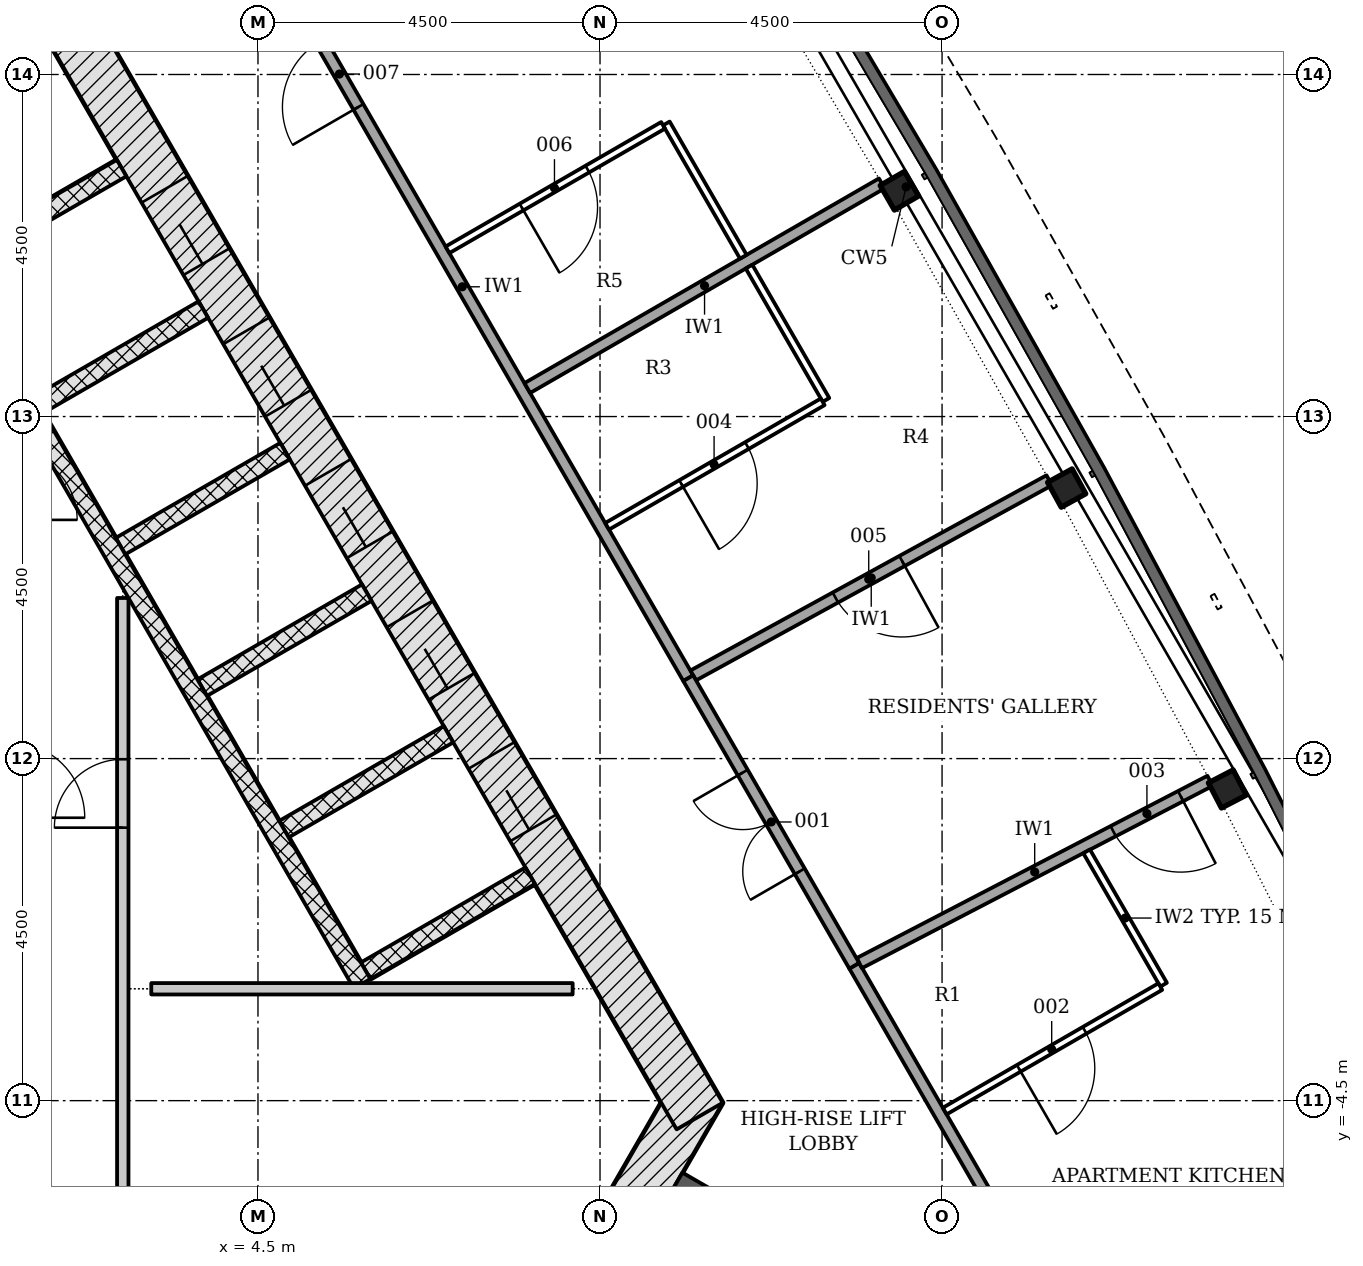
"""IFC4 building model, lengths in metres.
Left out: names, types, materials, properties, quantities, classifications, styles, units other than length and angle.
Written with IfcOpenShell. Run it as: python <this file> out.ifc"""

import sys

from ifc_helpers import new_model, si_unit, direction, frame, frame_2d, origin, origin_2d, place, context, subcontext, project, spatial, polyline, rectangle, i_section, outline, extrude, element, fill, save


model = new_model("IFC4")
c1 = context("Model", 3, precision=1e-05, world=origin(), true_north=direction((0.0, 1.0)))
c2 = subcontext(c1, "Body", "Model", "MODEL_VIEW")
j1 = project(units=[si_unit("LENGTHUNIT", "METRE"), si_unit("PLANEANGLEUNIT", "RADIAN")], contexts=[c1])
p1 = place(None, origin())
s1 = spatial("IfcSite", under=j1, at=p1, CompositionType="ELEMENT")
p2 = place(p1, origin())
s2 = spatial("IfcBuilding", under=s1, at=p2, CompositionType="ELEMENT")
p3 = place(p2, frame((0.0, 0.0, 222.0)))
s3 = spatial("IfcBuildingStorey", under=s2, at=p3, CompositionType="ELEMENT", Elevation=222.0)
p4 = place(p3, frame((8.926, -6.753, -0.2), z_axis=(0.0, 0.0, 1.0), x_axis=(0.500042739161, 0.866000726912, 0.0)))
e1 = element("IfcWall", 1, at=p4, inside=s3, PredefinedType="SHEAR", context=c2, shape_type="SweptSolid", body=[
    extrude(rectangle(XDim=2.771, YDim=0.7, at=frame_2d((1.386, 0.0))), origin(), (0.0, 0.0, 1.0), 3.6),
])
p5 = place(p3, frame((10.311, -4.703, -0.2), z_axis=(0.0, 0.0, 1.0), x_axis=(-0.500001446645, 0.866024568562, 0.0)))
e2 = element("IfcWall", 2, at=p5, inside=s3, PredefinedType="SHEAR", context=c2, shape_type="SweptSolid", body=[
    extrude(rectangle(XDim=18.458, YDim=0.7, at=frame_2d((9.229, 0.0))), origin(), (0.0, 0.0, 1.0), 3.6),
])
p6 = place(p5, frame((4.379, 0.0, 0.2)))
e3 = element("IfcOpeningElement", 3, at=p6, cuts=e2, PredefinedType="OPENING", context=c2, shape_type="SweptSolid", body=[
    extrude(rectangle(XDim=1.1, YDim=2.1, at=frame_2d((0.55, 1.05))), frame((0.0, 0.36, 0.0), z_axis=(0.0, -1.0, 0.0), x_axis=(1.0, 0.0, 0.0)), (0.0, 0.0, 1.0), 0.72),
])
p7 = place(p5, frame((6.529, 0.0, 0.2)))
e4 = element("IfcOpeningElement", 4, at=p7, cuts=e2, PredefinedType="OPENING", context=c2, shape_type="SweptSolid", body=[
    extrude(rectangle(XDim=1.1, YDim=2.1, at=frame_2d((0.55, 1.05))), frame((0.0, 0.36, 0.0), z_axis=(0.0, -1.0, 0.0), x_axis=(1.0, 0.0, 0.0)), (0.0, 0.0, 1.0), 0.72),
])
p8 = place(p5, frame((8.679, 0.0, 0.2)))
e5 = element("IfcOpeningElement", 5, at=p8, cuts=e2, PredefinedType="OPENING", context=c2, shape_type="SweptSolid", body=[
    extrude(rectangle(XDim=1.1, YDim=2.1, at=frame_2d((0.55, 1.05))), frame((0.0, 0.36, 0.0), z_axis=(0.0, -1.0, 0.0), x_axis=(1.0, 0.0, 0.0)), (0.0, 0.0, 1.0), 0.72),
])
p9 = place(p5, frame((10.829, 0.0, 0.2)))
e6 = element("IfcOpeningElement", 6, at=p9, cuts=e2, PredefinedType="OPENING", context=c2, shape_type="SweptSolid", body=[
    extrude(rectangle(XDim=1.1, YDim=2.1, at=frame_2d((0.55, 1.05))), frame((0.0, 0.36, 0.0), z_axis=(0.0, -1.0, 0.0), x_axis=(1.0, 0.0, 0.0)), (0.0, 0.0, 1.0), 0.72),
])
p10 = place(p5, frame((12.979, 0.0, 0.2)))
e7 = element("IfcOpeningElement", 7, at=p10, cuts=e2, PredefinedType="OPENING", context=c2, shape_type="SweptSolid", body=[
    extrude(rectangle(XDim=1.1, YDim=2.1, at=frame_2d((0.55, 1.05))), frame((0.0, 0.36, 0.0), z_axis=(0.0, -1.0, 0.0), x_axis=(1.0, 0.0, 0.0)), (0.0, 0.0, 1.0), 0.72),
])
p11 = place(p3, frame((9.922, -5.728, -0.2), z_axis=(0.0, 0.0, 1.0), x_axis=(0.866030911543, -0.499990460161, 0.0)))
e8 = element("IfcWall", 8, at=p11, inside=s3, PredefinedType="SHEAR", context=c2, shape_type="SweptSolid", body=[
    extrude(rectangle(XDim=8.359, YDim=0.65, at=frame_2d((4.179, 0.0))), origin(), (0.0, 0.0, 1.0), 3.6),
])
for number, where, z_axis, x_axis in (
    (9, (17.253, -0.4, -0.2), (0.0, 0.0, 1.0), (-0.461, 0.887, 0.0)),
    (10, (15.14, 3.559, -0.2), (0.0, 0.0, 1.0), (-0.481, 0.877, 0.0)),
    (11, (12.939, 7.47, -0.2), (0.0, 0.0, 1.0), (-0.5, 0.866, 0.0)),
):
    element("IfcColumn", number, at=place(p3, frame(where, z_axis=z_axis, x_axis=x_axis)), inside=s3, PredefinedType="COLUMN", context=c2, shape_type="SweptSolid", body=[
        extrude(i_section(OverallWidth=0.373, OverallDepth=0.368, WebThickness=0.015, FlangeThickness=0.024, FilletRadius=0.015, at=origin_2d()), origin(), (0.0, 0.0, 1.0), 3.6),
    ])
p12 = place(p3, origin())
e12 = element("IfcWall", 12, at=p12, inside=s3, PredefinedType="NOTDEFINED", context=c2, shape_type="SweptSolid", body=[
    extrude(outline(polyline([(13.49, -15.042), (15.507, -14.898), (16.988, -14.602), (18.354, -13.958), (19.526, -13.004), (20.434, -11.797), (21.025, -10.408), (21.265, -8.917), (21.139, -7.411), (20.656, -5.98), (19.772, -4.162), (19.502, -4.293), (20.378, -6.094), (20.844, -7.473), (20.963, -8.905), (20.735, -10.324), (20.172, -11.646), (19.308, -12.795), (18.193, -13.702), (16.893, -14.315), (15.467, -14.6), (13.469, -14.743), (13.49, -15.042)])), origin(), (0.0, 0.0, 1.0), 3.3),
])
for number, where, z_axis, x_axis in (
    (13, (8.081, -1.541, -0.2), (0.0, 0.0, 1.0), (-0.866, -0.5, 0.0)),
    (14, (7.006, 0.321, -0.2), (0.0, 0.0, 1.0), (-0.866, -0.5, 0.0)),
):
    element("IfcWall", number, at=place(p3, frame(where, z_axis=z_axis, x_axis=x_axis)), inside=s3, PredefinedType="PARTITIONING", context=c2, shape_type="SweptSolid", body=[
        extrude(rectangle(XDim=2.5, YDim=0.25, at=frame_2d((1.25, 0.0))), origin(), (0.0, 0.0, 1.0), 3.6),
    ])
p13 = place(p3, frame((5.931, 2.183, -0.2), z_axis=(0.0, 0.0, 1.0), x_axis=(-0.866047370643, -0.499961950354, 0.0)))
e15 = element("IfcWall", 15, at=p13, inside=s3, PredefinedType="PARTITIONING", context=c2, shape_type="SweptSolid", body=[
    extrude(rectangle(XDim=2.5, YDim=0.25, at=frame_2d((1.25, 0.0))), origin(), (0.0, 0.0, 1.0), 3.6),
])
for number, where, z_axis, x_axis in (
    (16, (4.856, 4.045, -0.2), (0.0, 0.0, 1.0), (-0.866, -0.5, 0.0)),
    (17, (3.781, 5.907, -0.2), (0.0, 0.0, 1.0), (-0.866, -0.5, 0.0)),
    (18, (2.706, 7.769, -0.2), (0.0, 0.0, 1.0), (-0.866, -0.5, 0.0)),
):
    element("IfcWall", number, at=place(p3, frame(where, z_axis=z_axis, x_axis=x_axis)), inside=s3, PredefinedType="PARTITIONING", context=c2, shape_type="SweptSolid", body=[
        extrude(rectangle(XDim=2.5, YDim=0.25, at=frame_2d((1.25, 0.0))), origin(), (0.0, 0.0, 1.0), 3.6),
    ])
p14 = place(p3, frame((5.87, -2.961, 0.0), z_axis=(0.0, 0.0, 1.0), x_axis=(-0.50000615651, 0.866021849293, 0.0)))
e19 = element("IfcWall", 19, at=p14, inside=s3, PredefinedType="PARTITIONING", context=c2, shape_type="SweptSolid", body=[
    extrude(rectangle(XDim=11.0, YDim=0.25, at=frame_2d((5.5, 0.0))), origin(), (0.0, 0.0, 1.0), 3.4),
])
p15 = place(p3, frame((2.721, -5.928, 0.0), z_axis=(0.0, 0.0, 1.0), x_axis=(0.0, 1.0, 0.0)))
e20 = element("IfcWall", 20, at=p15, inside=s3, PredefinedType="PARTITIONING", context=c2, shape_type="SweptSolid", body=[
    extrude(rectangle(XDim=8.041, YDim=0.15, at=frame_2d((4.021, 0.0))), origin(), (0.0, 0.0, 1.0), 3.4),
])
p16 = place(p15, frame((5.02, 0.0, 0.0)))
e21 = element("IfcOpeningElement", 21, at=p16, cuts=e20, PredefinedType="OPENING", context=c2, shape_type="SweptSolid", body=[
    extrude(rectangle(XDim=0.9, YDim=2.1, at=frame_2d((0.45, 1.05))), frame((0.0, 0.085, 0.0), z_axis=(0.0, -1.0, 0.0), x_axis=(1.0, 0.0, 0.0)), (0.0, 0.0, 1.0), 0.17),
])
p17 = place(p3, frame((3.096, -3.028, 0.0), z_axis=(0.0, 0.0, 1.0), x_axis=(1.0, 0.0, 0.0)))
e22 = element("IfcWall", 22, at=p17, inside=s3, PredefinedType="PARTITIONING", context=c2, shape_type="SweptSolid", body=[
    extrude(rectangle(XDim=5.544, YDim=0.15, at=frame_2d((2.772, 0.0))), origin(), (0.0, 0.0, 1.0), 3.4),
])
p18 = place(p3, frame((15.832, -8.765, 0.0), z_axis=(0.0, 0.0, 1.0), x_axis=(-0.500009302692, 0.866020032806, 0.0)))
e23 = element("IfcWall", 23, at=p18, inside=s3, PredefinedType="PARTITIONING", context=c2, shape_type="SweptSolid", body=[
    extrude(rectangle(XDim=6.974, YDim=0.15, at=frame_2d((3.487, 0.0))), origin(), (0.0, 0.0, 1.0), 2.852),
])
p19 = place(p3, frame((10.161, 1.058, 0.0), z_axis=(0.0, 0.0, 1.0), x_axis=(-0.500000866012, 0.866024903792, 0.0)))
e24 = element("IfcWall", 24, at=p19, inside=s3, PredefinedType="PARTITIONING", context=c2, shape_type="SweptSolid", body=[
    extrude(rectangle(XDim=11.892, YDim=0.15, at=frame_2d((5.946, 0.0))), origin(), (0.0, 0.0, 1.0), 2.852),
])
p20 = place(p19, frame((8.678, 0.0, 0.0)))
e25 = element("IfcOpeningElement", 25, at=p20, cuts=e24, PredefinedType="OPENING", context=c2, shape_type="SweptSolid", body=[
    extrude(rectangle(XDim=1.0, YDim=2.1, at=frame_2d((0.5, 1.05))), frame((0.0, 0.085, 0.0), z_axis=(0.0, -1.0, 0.0), x_axis=(1.0, 0.0, 0.0)), (0.0, 0.0, 1.0), 0.17),
])
p21 = place(p3, frame((17.026, -0.292, 0.0), z_axis=(0.0, 0.0, 1.0), x_axis=(-0.887303639302, -0.461185701947, 0.0)))
e26 = element("IfcWall", 26, at=p21, inside=s3, PredefinedType="PARTITIONING", context=c2, shape_type="SweptSolid", body=[
    extrude(rectangle(XDim=5.201, YDim=0.15, at=frame_2d((2.6, 0.0))), origin(), (0.0, 0.0, 1.0), 3.4),
])
p22 = place(p21, frame((0.436, 0.0, 0.0)))
e27 = element("IfcOpeningElement", 27, at=p22, cuts=e26, PredefinedType="OPENING", context=c2, shape_type="SweptSolid", body=[
    extrude(rectangle(XDim=1.0, YDim=2.1, at=frame_2d((0.5, 1.05))), frame((0.0, 0.085, 0.0), z_axis=(0.0, -1.0, 0.0), x_axis=(1.0, 0.0, 0.0)), (0.0, 0.0, 1.0), 0.17),
])
p23 = place(p3, frame((14.91, 3.661, 0.0), z_axis=(0.0, 0.0, 1.0), x_axis=(-0.87687518663, -0.480718116023, 0.0)))
e28 = element("IfcWall", 28, at=p23, inside=s3, PredefinedType="PARTITIONING", context=c2, shape_type="SweptSolid", body=[
    extrude(rectangle(XDim=5.341, YDim=0.15, at=frame_2d((2.671, 0.0))), origin(), (0.0, 0.0, 1.0), 3.4),
])
p24 = place(p23, frame((2.208, 0.0, 0.0)))
e29 = element("IfcOpeningElement", 29, at=p24, cuts=e28, PredefinedType="OPENING", context=c2, shape_type="SweptSolid", body=[
    extrude(rectangle(XDim=1.0, YDim=2.1, at=frame_2d((0.5, 1.05))), frame((0.0, 0.085, 0.0), z_axis=(0.0, -1.0, 0.0), x_axis=(1.0, 0.0, 0.0)), (0.0, 0.0, 1.0), 0.17),
])
p25 = place(p3, frame((12.345, -2.725, 0.0), z_axis=(0.0, 0.0, 1.0), x_axis=(-0.49999822179, 0.866026430432, 0.0)))
e30 = element("IfcWall", 30, at=p25, inside=s3, PredefinedType="PARTITIONING", context=c2, shape_type="SweptSolid", body=[
    extrude(rectangle(XDim=4.368, YDim=0.15, at=frame_2d((2.184, 0.0))), origin(), (0.0, 0.0, 1.0), 2.852),
])
p26 = place(p25, frame((1.434, 0.0, 0.0)))
e31 = element("IfcOpeningElement", 31, at=p26, cuts=e30, PredefinedType="OPENING", context=c2, shape_type="SweptSolid", body=[
    extrude(rectangle(XDim=1.5, YDim=2.1, at=frame_2d((0.75, 1.05))), frame((0.0, 0.085, 0.0), z_axis=(0.0, -1.0, 0.0), x_axis=(1.0, 0.0, 0.0)), (0.0, 0.0, 1.0), 0.17),
])
p27 = place(p3, frame((15.402, -1.221, 0.0), z_axis=(0.0, 0.0, 1.0), x_axis=(0.499990325971, -0.866030989016, 0.0)))
e32 = element("IfcWall", 32, at=p27, inside=s3, PredefinedType="PARTITIONING", context=c2, shape_type="SweptSolid", body=[
    extrude(rectangle(XDim=2.025, YDim=0.1, at=frame_2d((1.012, 0.0))), origin(), (0.0, 0.0, 1.0), 2.852),
])
p28 = place(p3, frame((16.371, -3.0, 0.0), z_axis=(0.0, 0.0, 1.0), x_axis=(-0.866027924134, -0.499995634601, 0.0)))
e33 = element("IfcWall", 33, at=p28, inside=s3, PredefinedType="PARTITIONING", context=c2, shape_type="SweptSolid", body=[
    extrude(rectangle(XDim=3.275, YDim=0.1, at=frame_2d((1.637, 0.0))), origin(), (0.0, 0.0, 1.0), 3.4),
])
p29 = place(p28, frame((1.15, 0.0, 0.0)))
e34 = element("IfcOpeningElement", 34, at=p29, cuts=e33, PredefinedType="OPENING", context=c2, shape_type="SweptSolid", body=[
    extrude(rectangle(XDim=1.0, YDim=2.1, at=frame_2d((0.5, 1.05))), frame((0.0, 0.06, 0.0), z_axis=(0.0, -1.0, 0.0), x_axis=(1.0, 0.0, 0.0)), (0.0, 0.0, 1.0), 0.12),
])
p30 = place(p3, frame((10.96, 6.472, 0.0), z_axis=(0.0, 0.0, 1.0), x_axis=(0.499990325971, -0.866030989016, 0.0)))
e35 = element("IfcWall", 35, at=p30, inside=s3, PredefinedType="PARTITIONING", context=c2, shape_type="SweptSolid", body=[
    extrude(rectangle(XDim=2.025, YDim=0.1, at=frame_2d((1.012, 0.0))), origin(), (0.0, 0.0, 1.0), 2.852),
])
p31 = place(p3, frame((11.93, 4.694, 0.0), z_axis=(0.0, 0.0, 1.0), x_axis=(-0.866027924134, -0.499995634601, 0.0)))
e36 = element("IfcWall", 36, at=p31, inside=s3, PredefinedType="PARTITIONING", context=c2, shape_type="SweptSolid", body=[
    extrude(rectangle(XDim=3.275, YDim=0.1, at=frame_2d((1.637, 0.0))), origin(), (0.0, 0.0, 1.0), 3.4),
])
p32 = place(p31, frame((1.15, 0.0, 0.0)))
e37 = element("IfcOpeningElement", 37, at=p32, cuts=e36, PredefinedType="OPENING", context=c2, shape_type="SweptSolid", body=[
    extrude(rectangle(XDim=1.0, YDim=2.1, at=frame_2d((0.5, 1.05))), frame((0.0, 0.06, 0.0), z_axis=(0.0, -1.0, 0.0), x_axis=(1.0, 0.0, 0.0)), (0.0, 0.0, 1.0), 0.12),
])
p33 = place(p3, frame((12.707, 7.567, 0.0), z_axis=(0.0, 0.0, 1.0), x_axis=(-0.866016468327, -0.500015476347, 0.0)))
e38 = element("IfcWall", 38, at=p33, inside=s3, PredefinedType="PARTITIONING", context=c2, shape_type="SweptSolid", body=[
    extrude(rectangle(XDim=5.385, YDim=0.15, at=frame_2d((2.692, 0.0))), origin(), (0.0, 0.0, 1.0), 3.4),
])
p34 = place(p3, frame((10.885, 6.602, 0.0), z_axis=(0.0, 0.0, 1.0), x_axis=(-0.499990325971, 0.866030989016, 0.0)))
e39 = element("IfcWall", 39, at=p34, inside=s3, PredefinedType="PARTITIONING", context=c2, shape_type="SweptSolid", body=[
    extrude(rectangle(XDim=2.025, YDim=0.1, at=frame_2d((1.012, 0.0))), origin(), (0.0, 0.0, 1.0), 3.4),
])
p35 = place(p3, frame((9.83, 8.331, 0.0), z_axis=(0.0, 0.0, 1.0), x_axis=(-0.865995643347, -0.500051543047, 0.0)))
e40 = element("IfcWall", 40, at=p35, inside=s3, PredefinedType="PARTITIONING", context=c2, shape_type="SweptSolid", body=[
    extrude(rectangle(XDim=3.275, YDim=0.1, at=frame_2d((1.638, 0.0))), origin(), (0.0, 0.0, 1.0), 3.4),
])
p36 = place(p35, frame((1.15, 0.0, 0.0)))
e41 = element("IfcOpeningElement", 41, at=p36, cuts=e40, PredefinedType="OPENING", context=c2, shape_type="SweptSolid", body=[
    extrude(rectangle(XDim=1.0, YDim=2.1, at=frame_2d((0.5, 1.05))), frame((0.0, 0.06, 0.0), z_axis=(0.0, -1.0, 0.0), x_axis=(1.0, 0.0, 0.0)), (0.0, 0.0, 1.0), 0.12),
])
p37 = place(p6, origin())
e42 = element("IfcDoor", 42, at=p37, inside=s3, OperationType="DOUBLE_DOOR_SLIDING", PredefinedType="DOOR", context=c2, shape_type="SweptSolid", body=[
    extrude(rectangle(XDim=1.1, YDim=2.1, at=frame_2d((0.55, 1.05))), frame((0.0, 0.025, 0.0), z_axis=(0.0, -1.0, 0.0), x_axis=(1.0, 0.0, 0.0)), (0.0, 0.0, 1.0), 0.05),
])
fill(e3, e42)
p38 = place(p7, origin())
e43 = element("IfcDoor", 43, at=p38, inside=s3, OperationType="DOUBLE_DOOR_SLIDING", PredefinedType="DOOR", context=c2, shape_type="SweptSolid", body=[
    extrude(rectangle(XDim=1.1, YDim=2.1, at=frame_2d((0.55, 1.05))), frame((0.0, 0.025, 0.0), z_axis=(0.0, -1.0, 0.0), x_axis=(1.0, 0.0, 0.0)), (0.0, 0.0, 1.0), 0.05),
])
fill(e4, e43)
p39 = place(p8, origin())
e44 = element("IfcDoor", 44, at=p39, inside=s3, OperationType="DOUBLE_DOOR_SLIDING", PredefinedType="DOOR", context=c2, shape_type="SweptSolid", body=[
    extrude(rectangle(XDim=1.1, YDim=2.1, at=frame_2d((0.55, 1.05))), frame((0.0, 0.025, 0.0), z_axis=(0.0, -1.0, 0.0), x_axis=(1.0, 0.0, 0.0)), (0.0, 0.0, 1.0), 0.05),
])
fill(e5, e44)
p40 = place(p9, origin())
e45 = element("IfcDoor", 45, at=p40, inside=s3, OperationType="DOUBLE_DOOR_SLIDING", PredefinedType="DOOR", context=c2, shape_type="SweptSolid", body=[
    extrude(rectangle(XDim=1.1, YDim=2.1, at=frame_2d((0.55, 1.05))), frame((0.0, 0.025, 0.0), z_axis=(0.0, -1.0, 0.0), x_axis=(1.0, 0.0, 0.0)), (0.0, 0.0, 1.0), 0.05),
])
fill(e6, e45)
p41 = place(p10, origin())
e46 = element("IfcDoor", 46, at=p41, inside=s3, OperationType="DOUBLE_DOOR_SLIDING", PredefinedType="DOOR", context=c2, shape_type="SweptSolid", body=[
    extrude(rectangle(XDim=1.1, YDim=2.1, at=frame_2d((0.55, 1.05))), frame((0.0, 0.025, 0.0), z_axis=(0.0, -1.0, 0.0), x_axis=(1.0, 0.0, 0.0)), (0.0, 0.0, 1.0), 0.05),
])
fill(e7, e46)
p42 = place(p16, origin())
e47 = element("IfcDoor", 47, at=p42, inside=s3, OperationType="SINGLE_SWING_LEFT", PredefinedType="DOOR", context=c2, shape_type="SweptSolid", body=[
    extrude(rectangle(XDim=0.9, YDim=2.1, at=frame_2d((0.45, 1.05))), frame((0.0, 0.025, 0.0), z_axis=(0.0, -1.0, 0.0), x_axis=(1.0, 0.0, 0.0)), (0.0, 0.0, 1.0), 0.05),
])
fill(e21, e47)
p43 = place(p26, origin())
e48 = element("IfcDoor", 48, at=p43, inside=s3, OperationType="DOUBLE_DOOR_SINGLE_SWING", PredefinedType="DOOR", context=c2, shape_type="SweptSolid", body=[
    extrude(rectangle(XDim=1.5, YDim=2.1, at=frame_2d((0.75, 1.05))), frame((0.0, 0.025, 0.0), z_axis=(0.0, -1.0, 0.0), x_axis=(1.0, 0.0, 0.0)), (0.0, 0.0, 1.0), 0.05),
])
fill(e31, e48)
p44 = place(p29, origin())
e49 = element("IfcDoor", 49, at=p44, inside=s3, OperationType="SINGLE_SWING_RIGHT", PredefinedType="DOOR", context=c2, shape_type="SweptSolid", body=[
    extrude(rectangle(XDim=1.0, YDim=2.1, at=frame_2d((0.5, 1.05))), frame((0.0, 0.025, 0.0), z_axis=(0.0, -1.0, 0.0), x_axis=(1.0, 0.0, 0.0)), (0.0, 0.0, 1.0), 0.05),
])
fill(e34, e49)
p45 = place(p22, origin())
e50 = element("IfcDoor", 50, at=p45, inside=s3, OperationType="SINGLE_SWING_LEFT", PredefinedType="DOOR", context=c2, shape_type="SweptSolid", body=[
    extrude(rectangle(XDim=1.0, YDim=2.1, at=frame_2d((0.5, 1.05))), frame((0.0, 0.025, 0.0), z_axis=(0.0, -1.0, 0.0), x_axis=(1.0, 0.0, 0.0)), (0.0, 0.0, 1.0), 0.05),
])
fill(e27, e50)
p46 = place(p32, origin())
e51 = element("IfcDoor", 51, at=p46, inside=s3, OperationType="SINGLE_SWING_RIGHT", PredefinedType="DOOR", context=c2, shape_type="SweptSolid", body=[
    extrude(rectangle(XDim=1.0, YDim=2.1, at=frame_2d((0.5, 1.05))), frame((0.0, 0.025, 0.0), z_axis=(0.0, -1.0, 0.0), x_axis=(1.0, 0.0, 0.0)), (0.0, 0.0, 1.0), 0.05),
])
fill(e37, e51)
p47 = place(p24, origin())
e52 = element("IfcDoor", 52, at=p47, inside=s3, OperationType="SINGLE_SWING_LEFT", PredefinedType="DOOR", context=c2, shape_type="SweptSolid", body=[
    extrude(rectangle(XDim=1.0, YDim=2.1, at=frame_2d((0.5, 1.05))), frame((0.0, 0.025, 0.0), z_axis=(0.0, -1.0, 0.0), x_axis=(1.0, 0.0, 0.0)), (0.0, 0.0, 1.0), 0.05),
])
fill(e29, e52)
p48 = place(p36, origin())
e53 = element("IfcDoor", 53, at=p48, inside=s3, OperationType="SINGLE_SWING_RIGHT", PredefinedType="DOOR", context=c2, shape_type="SweptSolid", body=[
    extrude(rectangle(XDim=1.0, YDim=2.1, at=frame_2d((0.5, 1.05))), frame((0.0, 0.025, 0.0), z_axis=(0.0, -1.0, 0.0), x_axis=(1.0, 0.0, 0.0)), (0.0, 0.0, 1.0), 0.05),
])
fill(e41, e53)
p49 = place(p20, origin())
e54 = element("IfcDoor", 54, at=p49, inside=s3, OperationType="SINGLE_SWING_LEFT", PredefinedType="DOOR", context=c2, shape_type="SweptSolid", body=[
    extrude(rectangle(XDim=1.0, YDim=2.1, at=frame_2d((0.5, 1.05))), frame((0.0, 0.025, 0.0), z_axis=(0.0, -1.0, 0.0), x_axis=(1.0, 0.0, 0.0)), (0.0, 0.0, 1.0), 0.05),
])
fill(e25, e54)
save(model, sys.argv[1])
